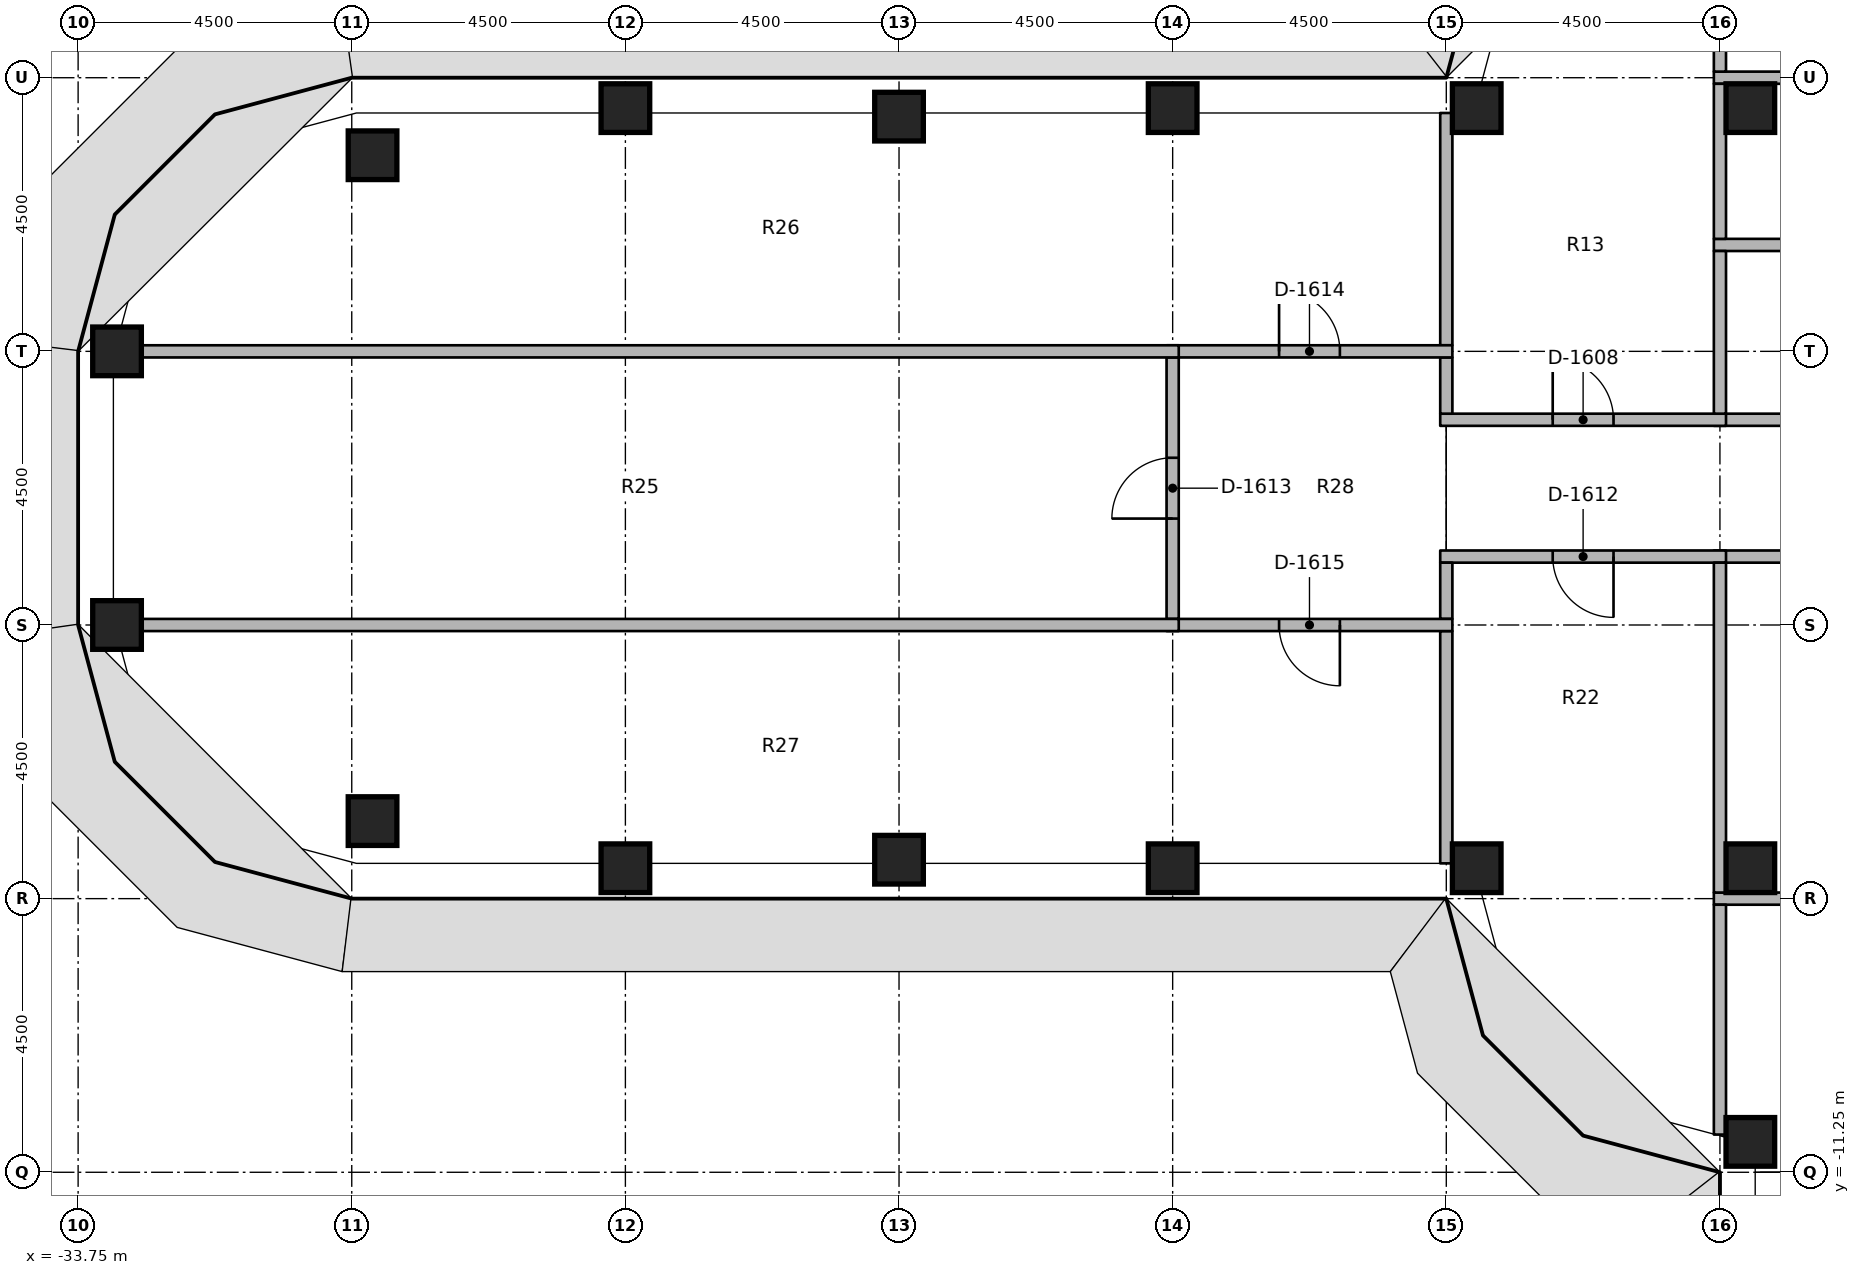
"""IFC4 building model, lengths in metres.
Left out: names, types, materials, properties, quantities, classifications, styles, units other than length and angle.
Written with IfcOpenShell. Run it as: python <this file> out.ifc"""

import sys

from ifc_helpers import new_model, si_unit, direction, frame, frame_2d, origin, origin_2d, place, context, subcontext, project, spatial, rectangle, extrude, element, fill, save


model = new_model("IFC4")
c1 = context("Model", 3, precision=1e-05, world=origin(), true_north=direction((0.0, 1.0)))
c2 = subcontext(c1, "Body", "Model", "MODEL_VIEW")
j1 = project(units=[si_unit("LENGTHUNIT", "METRE"), si_unit("PLANEANGLEUNIT", "RADIAN")], contexts=[c1])
p1 = place(None, origin())
s1 = spatial("IfcSite", under=j1, at=p1, CompositionType="ELEMENT")
p2 = place(p1, origin())
s2 = spatial("IfcBuilding", under=s1, at=p2, CompositionType="ELEMENT")
p3 = place(p2, frame((0.0, 0.0, 156.2)))
s3 = spatial("IfcBuildingStorey", under=s2, at=p3, CompositionType="ELEMENT", Elevation=156.2)
for number, where, z_axis, x_axis in (
    (1, (-33.11, -2.25, 0.0), (0.0, 0.0, 1.0), (1.0, 0.0, 0.0)),
    (2, (-33.11, 2.25, 0.0), (0.0, 0.0, 1.0), (1.0, 0.0, 0.0)),
    (3, (-28.908, -5.475, 0.0), (0.0, 0.0, 1.0), (1.0, 0.0, 0.0)),
    (4, (-28.908, 5.475, 0.0), (0.0, 0.0, 1.0), (1.0, 0.0, 0.0)),
    (5, (-24.75, -6.25, 0.0), (0.0, 0.0, 1.0), (1.0, 0.0, 0.0)),
    (6, (-24.75, 6.25, 0.0), (0.0, 0.0, 1.0), (1.0, 0.0, 0.0)),
    (7, (-20.25, -6.11, 0.0), (0.0, 0.0, 1.0), (1.0, 0.0, 0.0)),
    (8, (-20.25, 6.11, 0.0), (0.0, 0.0, 1.0), (1.0, 0.0, 0.0)),
    (9, (-15.75, -6.25, 0.0), (0.0, 0.0, 1.0), (1.0, 0.0, 0.0)),
    (10, (-15.75, 6.25, 0.0), (0.0, 0.0, 1.0), (1.0, 0.0, 0.0)),
    (11, (-10.75, -6.25, 0.0), (0.0, 0.0, 1.0), (1.0, 0.0, 0.0)),
    (12, (-10.75, 6.25, 0.0), (0.0, 0.0, 1.0), (1.0, 0.0, 0.0)),
    (13, (-6.25, -10.75, 0.0), (0.0, 0.0, 1.0), (1.0, 0.0, 0.0)),
    (14, (-6.25, -6.25, 0.0), (0.0, 0.0, 1.0), (1.0, 0.0, 0.0)),
    (15, (-6.25, 6.25, 0.0), (0.0, 0.0, 1.0), (1.0, 0.0, 0.0)),
):
    element("IfcColumn", number, at=place(p3, frame(where, z_axis=z_axis, x_axis=x_axis)), inside=s3, PredefinedType="COLUMN", context=c2, shape_type="SweptSolid", body=[
        extrude(rectangle(XDim=0.8, YDim=0.8, at=origin_2d()), origin(), (0.0, 0.0, 1.0), 3.65),
    ])
p4 = place(p3, frame((-6.85, 1.125, 0.0), z_axis=(0.0, 0.0, 1.0), x_axis=(1.0, 0.0, 0.0)))
e16 = element("IfcWall", 16, at=p4, inside=s3, PredefinedType="PARTITIONING", context=c2, shape_type="SweptSolid", body=[
    extrude(rectangle(XDim=5.825, YDim=0.2, at=frame_2d((2.913, 0.0))), origin(), (0.0, 0.0, 1.0), 2.75),
])
p5 = place(p4, frame((2.462, 0.0, 0.0)))
e17 = element("IfcOpeningElement", 17, at=p5, cuts=e16, PredefinedType="OPENING", context=c2, shape_type="SweptSolid", body=[
    extrude(rectangle(XDim=0.9, YDim=2.1, at=frame_2d((0.45, 1.05))), frame((0.0, 0.11, 0.0), z_axis=(0.0, -1.0, 0.0), x_axis=(1.0, 0.0, 0.0)), (0.0, 0.0, 1.0), 0.22),
])
p6 = place(p3, frame((-11.35, 1.125, 0.0), z_axis=(0.0, 0.0, 1.0), x_axis=(1.0, 0.0, 0.0)))
e18 = element("IfcWall", 18, at=p6, inside=s3, PredefinedType="PARTITIONING", context=c2, shape_type="SweptSolid", body=[
    extrude(rectangle(XDim=4.7, YDim=0.2, at=frame_2d((2.35, 0.0))), origin(), (0.0, 0.0, 1.0), 2.75),
])
p7 = place(p6, frame((1.85, 0.0, 0.0)))
e19 = element("IfcOpeningElement", 19, at=p7, cuts=e18, PredefinedType="OPENING", context=c2, shape_type="SweptSolid", body=[
    extrude(rectangle(XDim=1.0, YDim=2.1, at=frame_2d((0.5, 1.05))), frame((0.0, 0.11, 0.0), z_axis=(0.0, -1.0, 0.0), x_axis=(1.0, 0.0, 0.0)), (0.0, 0.0, 1.0), 0.22),
])
p8 = place(p3, frame((-1.025, -1.125, 0.0), z_axis=(0.0, 0.0, 1.0), x_axis=(-1.0, 0.0, 0.0)))
e20 = element("IfcWall", 20, at=p8, inside=s3, PredefinedType="PARTITIONING", context=c2, shape_type="SweptSolid", body=[
    extrude(rectangle(XDim=5.825, YDim=0.2, at=frame_2d((2.913, 0.0))), origin(), (0.0, 0.0, 1.0), 2.75),
])
p9 = place(p8, frame((2.413, 0.0, 0.0)))
e21 = element("IfcOpeningElement", 21, at=p9, cuts=e20, PredefinedType="OPENING", context=c2, shape_type="SweptSolid", body=[
    extrude(rectangle(XDim=1.0, YDim=2.1, at=frame_2d((0.5, 1.05))), frame((0.0, 0.11, 0.0), z_axis=(0.0, -1.0, 0.0), x_axis=(1.0, 0.0, 0.0)), (0.0, 0.0, 1.0), 0.22),
])
p10 = place(p3, frame((-6.65, -1.125, 0.0), z_axis=(0.0, 0.0, 1.0), x_axis=(-1.0, 0.0, 0.0)))
e22 = element("IfcWall", 22, at=p10, inside=s3, PredefinedType="PARTITIONING", context=c2, shape_type="SweptSolid", body=[
    extrude(rectangle(XDim=4.7, YDim=0.2, at=frame_2d((2.35, 0.0))), origin(), (0.0, 0.0, 1.0), 2.75),
])
p11 = place(p10, frame((1.85, 0.0, 0.0)))
e23 = element("IfcOpeningElement", 23, at=p11, cuts=e22, PredefinedType="OPENING", context=c2, shape_type="SweptSolid", body=[
    extrude(rectangle(XDim=1.0, YDim=2.1, at=frame_2d((0.5, 1.05))), frame((0.0, 0.11, 0.0), z_axis=(0.0, -1.0, 0.0), x_axis=(1.0, 0.0, 0.0)), (0.0, 0.0, 1.0), 0.22),
])
p12 = place(p3, frame((-6.85, 6.75, 0.0), z_axis=(0.0, 0.0, 1.0), x_axis=(1.0, 0.0, 0.0)))
e24 = element("IfcWall", 24, at=p12, inside=s3, PredefinedType="PARTITIONING", context=c2, shape_type="SweptSolid", body=[
    extrude(rectangle(XDim=5.825, YDim=0.2, at=frame_2d((2.913, 0.0))), origin(), (0.0, 0.0, 1.0), 2.75),
])
p13 = place(p3, frame((-6.75, 6.85, 0.0), z_axis=(0.0, 0.0, 1.0), x_axis=(0.0, 1.0, 0.0)))
e25 = element("IfcWall", 25, at=p13, inside=s3, PredefinedType="PARTITIONING", context=c2, shape_type="SweptSolid", body=[
    extrude(rectangle(XDim=3.78, YDim=0.2, at=frame_2d((1.89, 0.0))), origin(), (0.0, 0.0, 1.0), 2.75),
])
p14 = place(p3, frame((-6.85, -6.75, 0.0), z_axis=(0.0, 0.0, 1.0), x_axis=(1.0, 0.0, 0.0)))
e26 = element("IfcWall", 26, at=p14, inside=s3, PredefinedType="PARTITIONING", context=c2, shape_type="SweptSolid", body=[
    extrude(rectangle(XDim=5.825, YDim=0.2, at=frame_2d((2.913, 0.0))), origin(), (0.0, 0.0, 1.0), 2.75),
])
p15 = place(p3, frame((-6.75, -10.63, 0.0), z_axis=(0.0, 0.0, 1.0), x_axis=(0.0, 1.0, 0.0)))
e27 = element("IfcWall", 27, at=p15, inside=s3, PredefinedType="PARTITIONING", context=c2, shape_type="SweptSolid", body=[
    extrude(rectangle(XDim=3.78, YDim=0.2, at=frame_2d((1.89, 0.0))), origin(), (0.0, 0.0, 1.0), 2.75),
])
p16 = place(p3, frame((-6.85, 4.0, 0.0), z_axis=(0.0, 0.0, 1.0), x_axis=(1.0, 0.0, 0.0)))
e28 = element("IfcWall", 28, at=p16, inside=s3, PredefinedType="PARTITIONING", context=c2, shape_type="SweptSolid", body=[
    extrude(rectangle(XDim=5.825, YDim=0.2, at=frame_2d((2.913, 0.0))), origin(), (0.0, 0.0, 1.0), 2.75),
])
p17 = place(p3, frame((-6.75, 1.225, 0.0), z_axis=(0.0, 0.0, 1.0), x_axis=(0.0, 1.0, 0.0)))
e29 = element("IfcWall", 29, at=p17, inside=s3, PredefinedType="PARTITIONING", context=c2, shape_type="SweptSolid", body=[
    extrude(rectangle(XDim=2.675, YDim=0.2, at=frame_2d((1.337, 0.0))), origin(), (0.0, 0.0, 1.0), 2.75),
])
p18 = place(p3, frame((-6.75, 4.1, 0.0), z_axis=(0.0, 0.0, 1.0), x_axis=(0.0, 1.0, 0.0)))
e30 = element("IfcWall", 30, at=p18, inside=s3, PredefinedType="PARTITIONING", context=c2, shape_type="SweptSolid", body=[
    extrude(rectangle(XDim=2.55, YDim=0.2, at=frame_2d((1.275, 0.0))), origin(), (0.0, 0.0, 1.0), 2.75),
])
p19 = place(p3, frame((-11.25, 1.225, 0.0), z_axis=(0.0, 0.0, 1.0), x_axis=(0.0, 1.0, 0.0)))
e31 = element("IfcWall", 31, at=p19, inside=s3, PredefinedType="PARTITIONING", context=c2, shape_type="SweptSolid", body=[
    extrude(rectangle(XDim=0.925, YDim=0.2, at=frame_2d((0.462, 0.0))), origin(), (0.0, 0.0, 1.0), 2.75),
])
p20 = place(p3, frame((-11.25, 2.35, 0.0), z_axis=(0.0, 0.0, 1.0), x_axis=(0.0, 1.0, 0.0)))
e32 = element("IfcWall", 32, at=p20, inside=s3, PredefinedType="PARTITIONING", context=c2, shape_type="SweptSolid", body=[
    extrude(rectangle(XDim=3.82, YDim=0.2, at=frame_2d((1.91, 0.0))), origin(), (0.0, 0.0, 1.0), 2.75),
])
p21 = place(p3, frame((-6.75, -6.65, 0.0), z_axis=(0.0, 0.0, 1.0), x_axis=(0.0, 1.0, 0.0)))
e33 = element("IfcWall", 33, at=p21, inside=s3, PredefinedType="PARTITIONING", context=c2, shape_type="SweptSolid", body=[
    extrude(rectangle(XDim=5.425, YDim=0.2, at=frame_2d((2.712, 0.0))), origin(), (0.0, 0.0, 1.0), 2.75),
])
p22 = place(p3, frame((-11.25, -2.15, 0.0), z_axis=(0.0, 0.0, 1.0), x_axis=(0.0, 1.0, 0.0)))
e34 = element("IfcWall", 34, at=p22, inside=s3, PredefinedType="PARTITIONING", context=c2, shape_type="SweptSolid", body=[
    extrude(rectangle(XDim=0.925, YDim=0.2, at=frame_2d((0.462, 0.0))), origin(), (0.0, 0.0, 1.0), 2.75),
])
p23 = place(p3, frame((-11.25, -6.17, 0.0), z_axis=(0.0, 0.0, 1.0), x_axis=(0.0, 1.0, 0.0)))
e35 = element("IfcWall", 35, at=p23, inside=s3, PredefinedType="PARTITIONING", context=c2, shape_type="SweptSolid", body=[
    extrude(rectangle(XDim=3.82, YDim=0.2, at=frame_2d((1.91, 0.0))), origin(), (0.0, 0.0, 1.0), 2.75),
])
p24 = place(p3, frame((-15.85, 2.25, 0.0), z_axis=(0.0, 0.0, 1.0), x_axis=(1.0, 0.0, 0.0)))
e36 = element("IfcWall", 36, at=p24, inside=s3, PredefinedType="PARTITIONING", context=c2, shape_type="SweptSolid", body=[
    extrude(rectangle(XDim=4.7, YDim=0.2, at=frame_2d((2.35, 0.0))), origin(), (0.0, 0.0, 1.0), 2.75),
])
p25 = place(p24, frame((1.85, 0.0, 0.0)))
e37 = element("IfcOpeningElement", 37, at=p25, cuts=e36, PredefinedType="OPENING", context=c2, shape_type="SweptSolid", body=[
    extrude(rectangle(XDim=1.0, YDim=2.1, at=frame_2d((0.5, 1.05))), frame((0.0, 0.11, 0.0), z_axis=(0.0, -1.0, 0.0), x_axis=(1.0, 0.0, 0.0)), (0.0, 0.0, 1.0), 0.22),
])
p26 = place(p3, frame((-11.15, -2.25, 0.0), z_axis=(0.0, 0.0, 1.0), x_axis=(-1.0, 0.0, 0.0)))
e38 = element("IfcWall", 38, at=p26, inside=s3, PredefinedType="PARTITIONING", context=c2, shape_type="SweptSolid", body=[
    extrude(rectangle(XDim=4.7, YDim=0.2, at=frame_2d((2.35, 0.0))), origin(), (0.0, 0.0, 1.0), 2.75),
])
p27 = place(p26, frame((1.85, 0.0, 0.0)))
e39 = element("IfcOpeningElement", 39, at=p27, cuts=e38, PredefinedType="OPENING", context=c2, shape_type="SweptSolid", body=[
    extrude(rectangle(XDim=1.0, YDim=2.1, at=frame_2d((0.5, 1.05))), frame((0.0, 0.11, 0.0), z_axis=(0.0, -1.0, 0.0), x_axis=(1.0, 0.0, 0.0)), (0.0, 0.0, 1.0), 0.22),
])
p28 = place(p3, frame((-15.75, -2.15, 0.0), z_axis=(0.0, 0.0, 1.0), x_axis=(0.0, 1.0, 0.0)))
e40 = element("IfcWall", 40, at=p28, inside=s3, PredefinedType="PARTITIONING", context=c2, shape_type="SweptSolid", body=[
    extrude(rectangle(XDim=4.3, YDim=0.2, at=frame_2d((2.15, 0.0))), origin(), (0.0, 0.0, 1.0), 2.75),
])
p29 = place(p28, frame((1.65, 0.0, 0.0)))
e41 = element("IfcOpeningElement", 41, at=p29, cuts=e40, PredefinedType="OPENING", context=c2, shape_type="SweptSolid", body=[
    extrude(rectangle(XDim=1.0, YDim=2.1, at=frame_2d((0.5, 1.05))), frame((0.0, 0.11, 0.0), z_axis=(0.0, -1.0, 0.0), x_axis=(1.0, 0.0, 0.0)), (0.0, 0.0, 1.0), 0.22),
])
for number, where, z_axis, x_axis in (
    (42, (-32.71, 2.25, 0.0), (0.0, 0.0, 1.0), (1.0, 0.0, 0.0)),
    (43, (-32.71, -2.25, 0.0), (0.0, 0.0, 1.0), (1.0, 0.0, 0.0)),
):
    element("IfcWall", number, at=place(p3, frame(where, z_axis=z_axis, x_axis=x_axis)), inside=s3, PredefinedType="PARTITIONING", context=c2, shape_type="SweptSolid", body=[
        extrude(rectangle(XDim=17.06, YDim=0.2, at=frame_2d((8.53, 0.0))), origin(), (0.0, 0.0, 1.0), 2.75),
    ])
p30 = place(p7, origin())
e44 = element("IfcDoor", 44, at=p30, inside=s3, OperationType="SINGLE_SWING_RIGHT", PredefinedType="DOOR", context=c2, shape_type="SweptSolid", body=[
    extrude(rectangle(XDim=1.0, YDim=2.1, at=frame_2d((0.5, 1.05))), frame((0.0, 0.025, 0.0), z_axis=(0.0, -1.0, 0.0), x_axis=(1.0, 0.0, 0.0)), (0.0, 0.0, 1.0), 0.05),
])
fill(e19, e44)
p31 = place(p11, origin())
e45 = element("IfcDoor", 45, at=p31, inside=s3, OperationType="SINGLE_SWING_RIGHT", PredefinedType="DOOR", context=c2, shape_type="SweptSolid", body=[
    extrude(rectangle(XDim=1.0, YDim=2.1, at=frame_2d((0.5, 1.05))), frame((0.0, 0.025, 0.0), z_axis=(0.0, -1.0, 0.0), x_axis=(1.0, 0.0, 0.0)), (0.0, 0.0, 1.0), 0.05),
])
fill(e23, e45)
p32 = place(p29, origin())
e46 = element("IfcDoor", 46, at=p32, inside=s3, OperationType="SINGLE_SWING_RIGHT", PredefinedType="DOOR", context=c2, shape_type="SweptSolid", body=[
    extrude(rectangle(XDim=1.0, YDim=2.1, at=frame_2d((0.5, 1.05))), frame((0.0, 0.025, 0.0), z_axis=(0.0, -1.0, 0.0), x_axis=(1.0, 0.0, 0.0)), (0.0, 0.0, 1.0), 0.05),
])
fill(e41, e46)
p33 = place(p25, origin())
e47 = element("IfcDoor", 47, at=p33, inside=s3, OperationType="SINGLE_SWING_RIGHT", PredefinedType="DOOR", context=c2, shape_type="SweptSolid", body=[
    extrude(rectangle(XDim=1.0, YDim=2.1, at=frame_2d((0.5, 1.05))), frame((0.0, 0.025, 0.0), z_axis=(0.0, -1.0, 0.0), x_axis=(1.0, 0.0, 0.0)), (0.0, 0.0, 1.0), 0.05),
])
fill(e37, e47)
p34 = place(p27, origin())
e48 = element("IfcDoor", 48, at=p34, inside=s3, OperationType="SINGLE_SWING_RIGHT", PredefinedType="DOOR", context=c2, shape_type="SweptSolid", body=[
    extrude(rectangle(XDim=1.0, YDim=2.1, at=frame_2d((0.5, 1.05))), frame((0.0, 0.025, 0.0), z_axis=(0.0, -1.0, 0.0), x_axis=(1.0, 0.0, 0.0)), (0.0, 0.0, 1.0), 0.05),
])
fill(e39, e48)
save(model, sys.argv[1])
